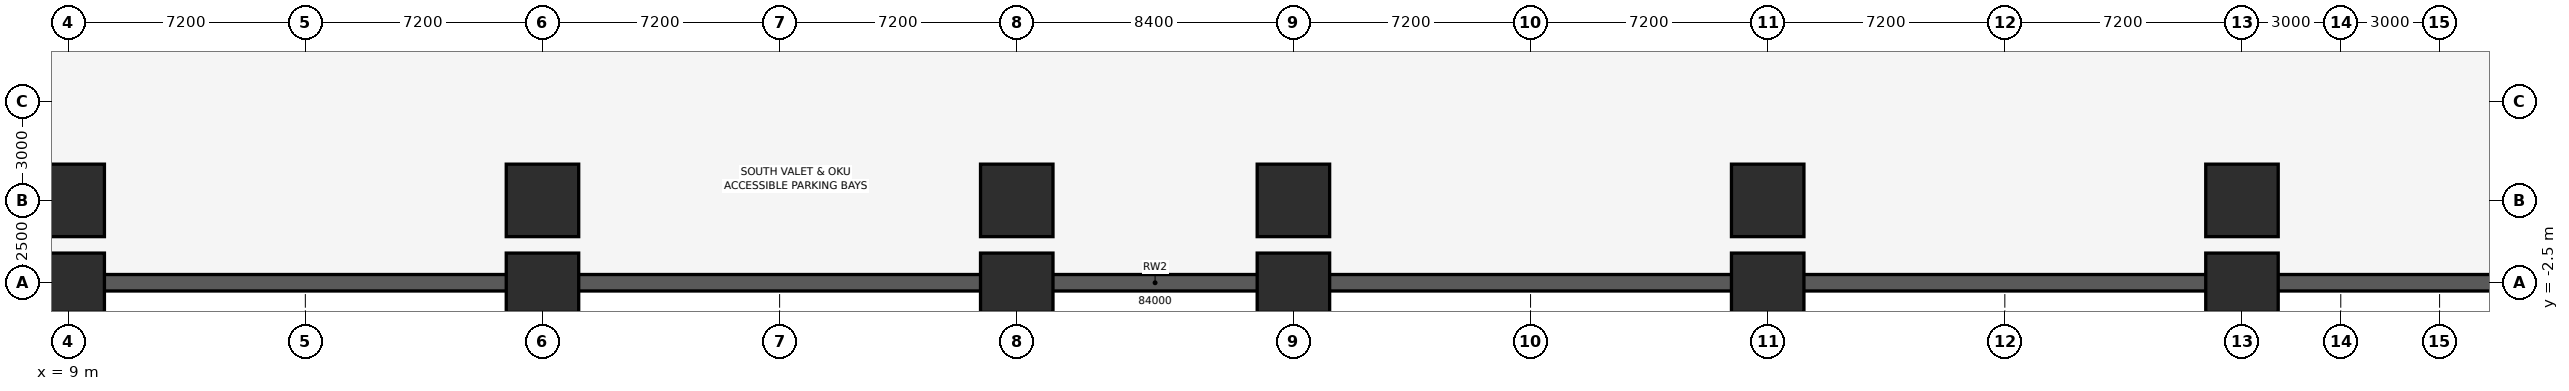
"""IFC4 building model, lengths in metres.
Left out: names, types, materials, properties, quantities, classifications, styles, units other than length and angle.
Written with IfcOpenShell. Run it as: python <this file> out.ifc"""

import sys

from ifc_helpers import new_model, si_unit, direction, frame, frame_2d, origin, origin_2d, place, context, subcontext, project, spatial, rectangle, circle, extrude, element, save


model = new_model("IFC4")
c1 = context("Model", 3, precision=1e-05, world=origin(), true_north=direction((0.0, 1.0)))
c2 = subcontext(c1, "Body", "Model", "MODEL_VIEW")
j1 = project(units=[si_unit("LENGTHUNIT", "METRE"), si_unit("PLANEANGLEUNIT", "RADIAN")], contexts=[c1])
p1 = place(None, origin())
s1 = spatial("IfcSite", under=j1, at=p1, CompositionType="ELEMENT")
p2 = place(p1, origin())
s2 = spatial("IfcBuilding", under=s1, at=p2, CompositionType="ELEMENT")
p3 = place(p2, frame((0.0, 0.0, -4.6)))
s3 = spatial("IfcBuildingStorey", under=s2, at=p3, CompositionType="ELEMENT", Elevation=-4.6)
p4 = place(p3, frame((9.0, 0.0, 0.0), z_axis=(0.0, 0.0, 1.0), x_axis=(1.0, 0.0, 0.0)))
e1 = element("IfcColumn", 1, at=p4, inside=s3, PredefinedType="USERDEFINED", context=c2, shape_type="SweptSolid", body=[
    extrude(circle(Radius=1.1, at=origin_2d()), origin(), (0.0, 0.0, 1.0), 4.25),
])
p5 = place(p3, frame((9.0, -2.5, 0.0), z_axis=(0.0, 0.0, 1.0), x_axis=(1.0, 0.0, 0.0)))
e2 = element("IfcColumn", 2, at=p5, inside=s3, PredefinedType="USERDEFINED", context=c2, shape_type="SweptSolid", body=[
    extrude(rectangle(XDim=2.2, YDim=1.8, at=origin_2d()), origin(), (0.0, 0.0, 1.0), 4.25),
])
p6 = place(p3, frame((23.4, 0.0, 0.0), z_axis=(0.0, 0.0, 1.0), x_axis=(1.0, 0.0, 0.0)))
e3 = element("IfcColumn", 3, at=p6, inside=s3, PredefinedType="USERDEFINED", context=c2, shape_type="SweptSolid", body=[
    extrude(circle(Radius=1.1, at=origin_2d()), origin(), (0.0, 0.0, 1.0), 4.25),
])
p7 = place(p3, frame((23.4, -2.5, 0.0), z_axis=(0.0, 0.0, 1.0), x_axis=(1.0, 0.0, 0.0)))
e4 = element("IfcColumn", 4, at=p7, inside=s3, PredefinedType="USERDEFINED", context=c2, shape_type="SweptSolid", body=[
    extrude(rectangle(XDim=2.2, YDim=1.8, at=origin_2d()), origin(), (0.0, 0.0, 1.0), 4.25),
])
p8 = place(p3, frame((37.8, 0.0, 0.0), z_axis=(0.0, 0.0, 1.0), x_axis=(1.0, 0.0, 0.0)))
e5 = element("IfcColumn", 5, at=p8, inside=s3, PredefinedType="USERDEFINED", context=c2, shape_type="SweptSolid", body=[
    extrude(circle(Radius=1.1, at=origin_2d()), origin(), (0.0, 0.0, 1.0), 4.25),
])
p9 = place(p3, frame((37.8, -2.5, 0.0), z_axis=(0.0, 0.0, 1.0), x_axis=(1.0, 0.0, 0.0)))
e6 = element("IfcColumn", 6, at=p9, inside=s3, PredefinedType="USERDEFINED", context=c2, shape_type="SweptSolid", body=[
    extrude(rectangle(XDim=2.2, YDim=1.8, at=origin_2d()), origin(), (0.0, 0.0, 1.0), 4.25),
])
p10 = place(p3, frame((46.2, 0.0, 0.0), z_axis=(0.0, 0.0, 1.0), x_axis=(1.0, 0.0, 0.0)))
e7 = element("IfcColumn", 7, at=p10, inside=s3, PredefinedType="USERDEFINED", context=c2, shape_type="SweptSolid", body=[
    extrude(circle(Radius=1.1, at=origin_2d()), origin(), (0.0, 0.0, 1.0), 4.25),
])
p11 = place(p3, frame((46.2, -2.5, 0.0), z_axis=(0.0, 0.0, 1.0), x_axis=(1.0, 0.0, 0.0)))
e8 = element("IfcColumn", 8, at=p11, inside=s3, PredefinedType="USERDEFINED", context=c2, shape_type="SweptSolid", body=[
    extrude(rectangle(XDim=2.2, YDim=1.8, at=origin_2d()), origin(), (0.0, 0.0, 1.0), 4.25),
])
p12 = place(p3, frame((60.6, 0.0, 0.0), z_axis=(0.0, 0.0, 1.0), x_axis=(1.0, 0.0, 0.0)))
e9 = element("IfcColumn", 9, at=p12, inside=s3, PredefinedType="USERDEFINED", context=c2, shape_type="SweptSolid", body=[
    extrude(circle(Radius=1.1, at=origin_2d()), origin(), (0.0, 0.0, 1.0), 4.25),
])
p13 = place(p3, frame((60.6, -2.5, 0.0), z_axis=(0.0, 0.0, 1.0), x_axis=(1.0, 0.0, 0.0)))
e10 = element("IfcColumn", 10, at=p13, inside=s3, PredefinedType="USERDEFINED", context=c2, shape_type="SweptSolid", body=[
    extrude(rectangle(XDim=2.2, YDim=1.8, at=origin_2d()), origin(), (0.0, 0.0, 1.0), 4.25),
])
p14 = place(p3, frame((75.0, 0.0, 0.0), z_axis=(0.0, 0.0, 1.0), x_axis=(1.0, 0.0, 0.0)))
e11 = element("IfcColumn", 11, at=p14, inside=s3, PredefinedType="USERDEFINED", context=c2, shape_type="SweptSolid", body=[
    extrude(circle(Radius=1.1, at=origin_2d()), origin(), (0.0, 0.0, 1.0), 4.25),
])
p15 = place(p3, frame((75.0, -2.5, 0.0), z_axis=(0.0, 0.0, 1.0), x_axis=(1.0, 0.0, 0.0)))
e12 = element("IfcColumn", 12, at=p15, inside=s3, PredefinedType="USERDEFINED", context=c2, shape_type="SweptSolid", body=[
    extrude(rectangle(XDim=2.2, YDim=1.8, at=origin_2d()), origin(), (0.0, 0.0, 1.0), 4.25),
])
p16 = place(p3, frame((0.4, -2.5, 0.0), z_axis=(0.0, 0.0, 1.0), x_axis=(1.0, 0.0, 0.0)))
e13 = element("IfcWall", 13, at=p16, inside=s3, PredefinedType="USERDEFINED", context=c2, shape_type="SweptSolid", body=[
    extrude(rectangle(XDim=83.2, YDim=0.5, at=frame_2d((41.6, 0.0))), origin(), (0.0, 0.0, 1.0), 4.25),
])
save(model, sys.argv[1])
